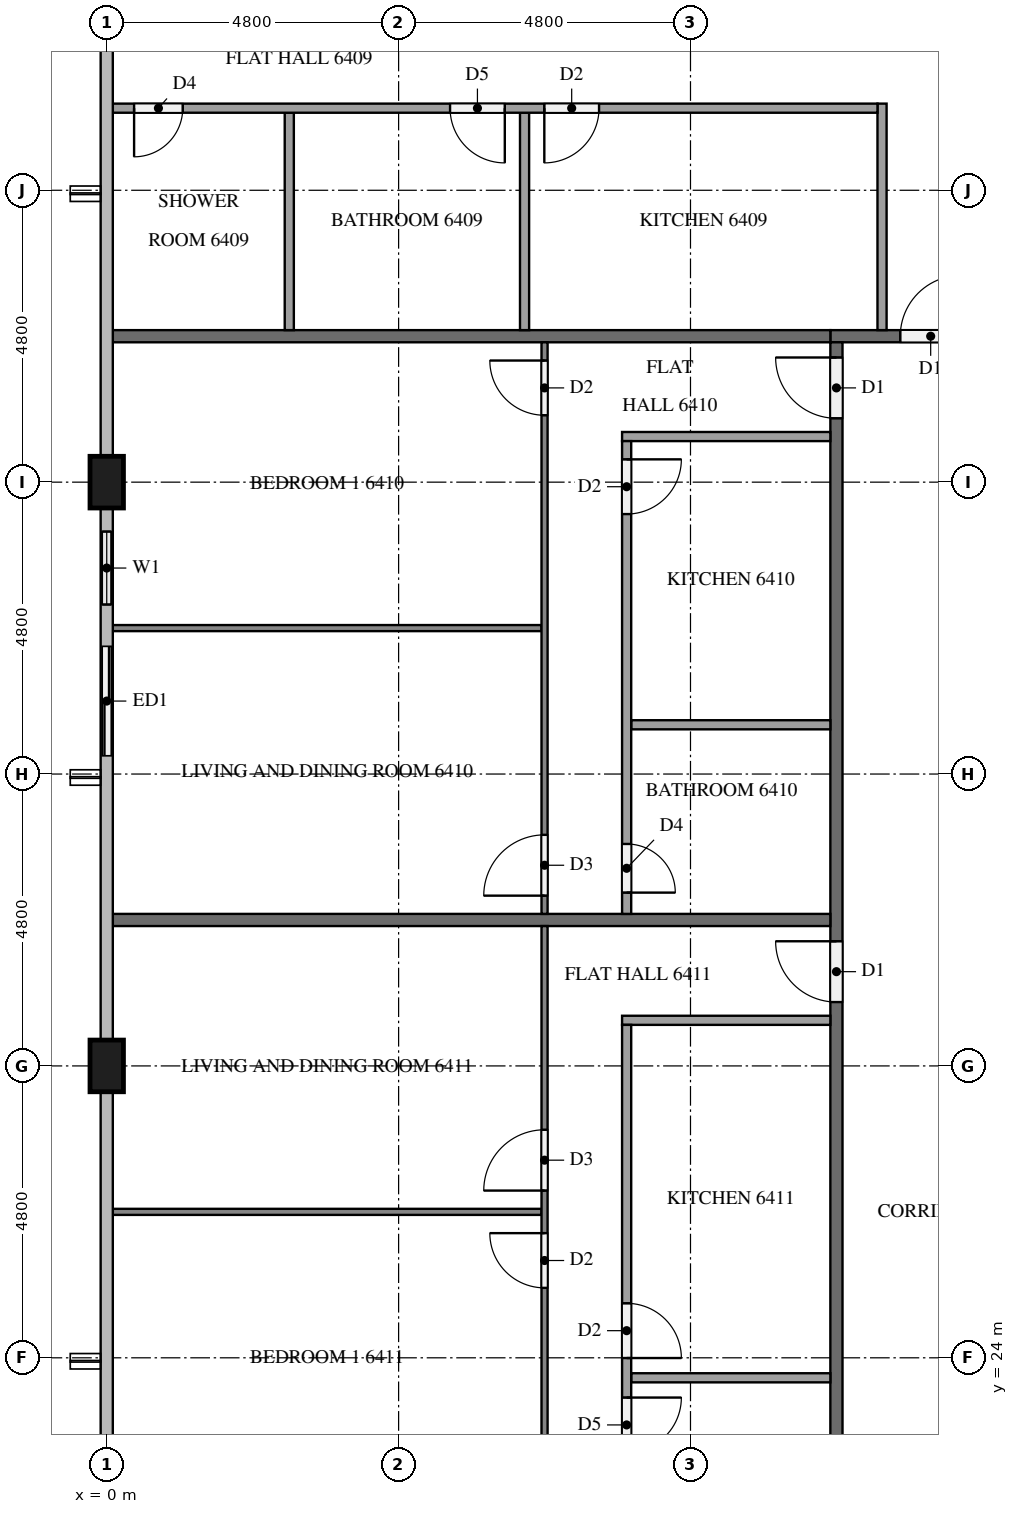
"""IFC4 building model, lengths in metres.
Left out: names, types, materials, properties, quantities, classifications, styles, units other than length and angle.
Written with IfcOpenShell. Run it as: python <this file> out.ifc"""

import sys

from ifc_helpers import new_model, si_unit, direction, frame, frame_2d, origin, origin_2d, place, context, subcontext, project, spatial, rectangle, extrude, element, fill, save


model = new_model("IFC4")
c1 = context("Model", 3, precision=1e-05, world=origin(), true_north=direction((0.0, 1.0)))
c2 = subcontext(c1, "Body", "Model", "MODEL_VIEW")
j1 = project(units=[si_unit("LENGTHUNIT", "METRE"), si_unit("PLANEANGLEUNIT", "RADIAN")], contexts=[c1])
p1 = place(None, origin())
s1 = spatial("IfcSite", under=j1, at=p1, CompositionType="ELEMENT")
p2 = place(p1, origin())
s2 = spatial("IfcBuilding", under=s1, at=p2, CompositionType="ELEMENT")
p3 = place(p2, frame((0.0, 0.0, 245.7)))
s3 = spatial("IfcBuildingStorey", under=s2, at=p3, CompositionType="ELEMENT", Elevation=245.7)
for number, where, z_axis, x_axis in (
    (1, (0.0, 38.4, 0.0), (0.0, 0.0, 1.0), (0.0, 1.0, 0.0)),
    (2, (0.0, 28.8, 0.0), (0.0, 0.0, 1.0), (0.0, 1.0, 0.0)),
):
    element("IfcColumn", number, at=place(p3, frame(where, z_axis=z_axis, x_axis=x_axis)), inside=s3, PredefinedType="COLUMN", context=c2, shape_type="SweptSolid", body=[
        extrude(rectangle(XDim=0.85, YDim=0.55, at=origin_2d()), origin(), (0.0, 0.0, 1.0), 3.2),
    ])
p4 = place(p3, frame((0.0, 37.975, 0.0), z_axis=(0.0, 0.0, 1.0), x_axis=(0.0, -1.0, 0.0)))
e3 = element("IfcWall", 3, at=p4, inside=s3, PredefinedType="SOLIDWALL", context=c2, shape_type="SweptSolid", body=[
    extrude(rectangle(XDim=4.375, YDim=0.15, at=frame_2d((2.188, 0.0))), origin(), (0.0, 0.0, 1.0), 3.2),
])
p5 = place(p4, frame((0.387, 0.0, 0.9)))
e4 = element("IfcOpeningElement", 4, at=p5, cuts=e3, PredefinedType="OPENING", context=c2, shape_type="SweptSolid", body=[
    extrude(rectangle(XDim=1.2, YDim=1.4, at=frame_2d((0.6, 0.7))), frame((0.0, 0.085, 0.0), z_axis=(0.0, -1.0, 0.0), x_axis=(1.0, 0.0, 0.0)), (0.0, 0.0, 1.0), 0.17),
])
p6 = place(p4, frame((2.275, 0.0, 0.0)))
e5 = element("IfcOpeningElement", 5, at=p6, cuts=e3, PredefinedType="OPENING", context=c2, shape_type="SweptSolid", body=[
    extrude(rectangle(XDim=1.8, YDim=2.4, at=frame_2d((0.9, 1.2))), frame((0.0, 0.085, 0.0), z_axis=(0.0, -1.0, 0.0), x_axis=(1.0, 0.0, 0.0)), (0.0, 0.0, 1.0), 0.17),
])
p7 = place(p3, frame((11.9, 40.8, 0.0), z_axis=(0.0, 0.0, 1.0), x_axis=(1.0, 0.0, 0.0)))
e6 = element("IfcWall", 6, at=p7, inside=s3, PredefinedType="PARTITIONING", context=c2, shape_type="SweptSolid", body=[
    extrude(rectangle(XDim=38.6, YDim=0.2, at=frame_2d((19.3, 0.0))), origin(), (0.0, 0.0, 1.0), 3.2),
])
p8 = place(p7, frame((34.05, 0.0, 0.0)))
e7 = element("IfcOpeningElement", 7, at=p8, cuts=e6, PredefinedType="OPENING", context=c2, shape_type="SweptSolid", body=[
    extrude(rectangle(XDim=1.0, YDim=2.1, at=frame_2d((0.5, 1.05))), frame((0.0, 0.11, 0.0), z_axis=(0.0, -1.0, 0.0), x_axis=(1.0, 0.0, 0.0)), (0.0, 0.0, 1.0), 0.22),
])
p9 = place(p7, frame((32.3, 0.0, 0.0)))
e8 = element("IfcOpeningElement", 8, at=p9, cuts=e6, PredefinedType="OPENING", context=c2, shape_type="SweptSolid", body=[
    extrude(rectangle(XDim=1.1, YDim=2.1, at=frame_2d((0.55, 1.05))), frame((0.0, 0.11, 0.0), z_axis=(0.0, -1.0, 0.0), x_axis=(1.0, 0.0, 0.0)), (0.0, 0.0, 1.0), 0.22),
])
p10 = place(p7, frame((2.85, 0.0, 0.0)))
e9 = element("IfcOpeningElement", 9, at=p10, cuts=e6, PredefinedType="OPENING", context=c2, shape_type="SweptSolid", body=[
    extrude(rectangle(XDim=1.0, YDim=2.1, at=frame_2d((0.5, 1.05))), frame((0.0, 0.11, 0.0), z_axis=(0.0, -1.0, 0.0), x_axis=(1.0, 0.0, 0.0)), (0.0, 0.0, 1.0), 0.22),
])
p11 = place(p7, frame((1.15, 0.0, 0.0)))
e10 = element("IfcOpeningElement", 10, at=p11, cuts=e6, PredefinedType="OPENING", context=c2, shape_type="SweptSolid", body=[
    extrude(rectangle(XDim=1.0, YDim=2.1, at=frame_2d((0.5, 1.05))), frame((0.0, 0.11, 0.0), z_axis=(0.0, -1.0, 0.0), x_axis=(1.0, 0.0, 0.0)), (0.0, 0.0, 1.0), 0.22),
])
p12 = place(p3, frame((12.0, 12.1, 0.0), z_axis=(0.0, 0.0, 1.0), x_axis=(0.0, 1.0, 0.0)))
e11 = element("IfcWall", 11, at=p12, inside=s3, PredefinedType="PARTITIONING", context=c2, shape_type="SweptSolid", body=[
    extrude(rectangle(XDim=28.6, YDim=0.2, at=frame_2d((14.3, 0.0))), origin(), (0.0, 0.0, 1.0), 3.2),
])
p13 = place(p12, frame((27.35, 0.0, 0.0)))
e12 = element("IfcOpeningElement", 12, at=p13, cuts=e11, PredefinedType="OPENING", context=c2, shape_type="SweptSolid", body=[
    extrude(rectangle(XDim=1.0, YDim=2.1, at=frame_2d((0.5, 1.05))), frame((0.0, 0.11, 0.0), z_axis=(0.0, -1.0, 0.0), x_axis=(1.0, 0.0, 0.0)), (0.0, 0.0, 1.0), 0.22),
])
p14 = place(p12, frame((17.75, 0.0, 0.0)))
e13 = element("IfcOpeningElement", 13, at=p14, cuts=e11, PredefinedType="OPENING", context=c2, shape_type="SweptSolid", body=[
    extrude(rectangle(XDim=1.0, YDim=2.1, at=frame_2d((0.5, 1.05))), frame((0.0, 0.11, 0.0), z_axis=(0.0, -1.0, 0.0), x_axis=(1.0, 0.0, 0.0)), (0.0, 0.0, 1.0), 0.22),
])
p15 = place(p12, frame((3.35, 0.0, 0.0)))
e14 = element("IfcOpeningElement", 14, at=p15, cuts=e11, PredefinedType="OPENING", context=c2, shape_type="SweptSolid", body=[
    extrude(rectangle(XDim=1.0, YDim=2.1, at=frame_2d((0.5, 1.05))), frame((0.0, 0.11, 0.0), z_axis=(0.0, -1.0, 0.0), x_axis=(1.0, 0.0, 0.0)), (0.0, 0.0, 1.0), 0.22),
])
for number, where, z_axis, x_axis in (
    (15, (0.1, 40.8, 0.0), (0.0, 0.0, 1.0), (1.0, 0.0, 0.0)),
    (16, (0.1, 31.2, 0.0), (0.0, 0.0, 1.0), (1.0, 0.0, 0.0)),
):
    element("IfcWall", number, at=place(p3, frame(where, z_axis=z_axis, x_axis=x_axis)), inside=s3, PredefinedType="PARTITIONING", context=c2, shape_type="SweptSolid", body=[
        extrude(rectangle(XDim=11.8, YDim=0.2, at=frame_2d((5.9, 0.0))), origin(), (0.0, 0.0, 1.0), 3.2),
    ])
for number, where, z_axis, x_axis in (
    (17, (6.871, 40.9, 0.0), (0.0, 0.0, 1.0), (0.0, 1.0, 0.0)),
    (18, (3.002, 40.9, 0.0), (0.0, 0.0, 1.0), (0.0, 1.0, 0.0)),
):
    element("IfcWall", number, at=place(p3, frame(where, z_axis=z_axis, x_axis=x_axis)), inside=s3, PredefinedType="PARTITIONING", context=c2, shape_type="SweptSolid", body=[
        extrude(rectangle(XDim=3.575, YDim=0.15, at=frame_2d((1.788, 0.0))), origin(), (0.0, 0.0, 1.0), 3.2),
    ])
p16 = place(p3, frame((12.75, 40.9, 0.0), z_axis=(0.0, 0.0, 1.0), x_axis=(0.0, 1.0, 0.0)))
e19 = element("IfcWall", 19, at=p16, inside=s3, PredefinedType="PARTITIONING", context=c2, shape_type="SweptSolid", body=[
    extrude(rectangle(XDim=3.725, YDim=0.15, at=frame_2d((1.863, 0.0))), origin(), (0.0, 0.0, 1.0), 3.2),
])
p17 = place(p3, frame((12.675, 44.55, 0.0), z_axis=(0.0, 0.0, 1.0), x_axis=(-1.0, 0.0, 0.0)))
e20 = element("IfcWall", 20, at=p17, inside=s3, PredefinedType="PARTITIONING", context=c2, shape_type="SweptSolid", body=[
    extrude(rectangle(XDim=12.575, YDim=0.15, at=frame_2d((6.288, 0.0))), origin(), (0.0, 0.0, 1.0), 3.2),
])
p18 = place(p17, frame((4.579, 0.0, 0.0)))
e21 = element("IfcOpeningElement", 21, at=p18, cuts=e20, PredefinedType="OPENING", context=c2, shape_type="SweptSolid", body=[
    extrude(rectangle(XDim=0.9, YDim=2.1, at=frame_2d((0.45, 1.05))), frame((0.0, 0.085, 0.0), z_axis=(0.0, -1.0, 0.0), x_axis=(1.0, 0.0, 0.0)), (0.0, 0.0, 1.0), 0.17),
])
p19 = place(p17, frame((6.129, 0.0, 0.0)))
e22 = element("IfcOpeningElement", 22, at=p19, cuts=e20, PredefinedType="OPENING", context=c2, shape_type="SweptSolid", body=[
    extrude(rectangle(XDim=0.9, YDim=2.1, at=frame_2d((0.45, 1.05))), frame((0.0, 0.085, 0.0), z_axis=(0.0, -1.0, 0.0), x_axis=(1.0, 0.0, 0.0)), (0.0, 0.0, 1.0), 0.17),
])
p20 = place(p17, frame((11.425, 0.0, 0.0)))
e23 = element("IfcOpeningElement", 23, at=p20, cuts=e20, PredefinedType="OPENING", context=c2, shape_type="SweptSolid", body=[
    extrude(rectangle(XDim=0.8, YDim=2.1, at=frame_2d((0.4, 1.05))), frame((0.0, 0.085, 0.0), z_axis=(0.0, -1.0, 0.0), x_axis=(1.0, 0.0, 0.0)), (0.0, 0.0, 1.0), 0.17),
])
p21 = place(p3, frame((7.15, 36.0, 0.0), z_axis=(0.0, 0.0, 1.0), x_axis=(-1.0, 0.0, 0.0)))
e24 = element("IfcWall", 24, at=p21, inside=s3, PredefinedType="PARTITIONING", context=c2, shape_type="SweptSolid", body=[
    extrude(rectangle(XDim=7.05, YDim=0.1, at=frame_2d((3.525, 0.0))), origin(), (0.0, 0.0, 1.0), 3.2),
])
p22 = place(p3, frame((7.2, 31.3, 0.0), z_axis=(0.0, 0.0, 1.0), x_axis=(0.0, 1.0, 0.0)))
e25 = element("IfcWall", 25, at=p22, inside=s3, PredefinedType="PARTITIONING", context=c2, shape_type="SweptSolid", body=[
    extrude(rectangle(XDim=9.4, YDim=0.1, at=frame_2d((4.7, 0.0))), origin(), (0.0, 0.0, 1.0), 3.2),
])
p23 = place(p22, frame((8.2, 0.0, 0.0)))
e26 = element("IfcOpeningElement", 26, at=p23, cuts=e25, PredefinedType="OPENING", context=c2, shape_type="SweptSolid", body=[
    extrude(rectangle(XDim=0.9, YDim=2.1, at=frame_2d((0.45, 1.05))), frame((0.0, 0.06, 0.0), z_axis=(0.0, -1.0, 0.0), x_axis=(1.0, 0.0, 0.0)), (0.0, 0.0, 1.0), 0.12),
])
p24 = place(p22, frame((0.3, 0.0, 0.0)))
e27 = element("IfcOpeningElement", 27, at=p24, cuts=e25, PredefinedType="OPENING", context=c2, shape_type="SweptSolid", body=[
    extrude(rectangle(XDim=1.0, YDim=2.1, at=frame_2d((0.5, 1.05))), frame((0.0, 0.06, 0.0), z_axis=(0.0, -1.0, 0.0), x_axis=(1.0, 0.0, 0.0)), (0.0, 0.0, 1.0), 0.12),
])
p25 = place(p3, frame((11.9, 34.41, 0.0), z_axis=(0.0, 0.0, 1.0), x_axis=(-1.0, 0.0, 0.0)))
e28 = element("IfcWall", 28, at=p25, inside=s3, PredefinedType="PARTITIONING", context=c2, shape_type="SweptSolid", body=[
    extrude(rectangle(XDim=3.275, YDim=0.15, at=frame_2d((1.637, 0.0))), origin(), (0.0, 0.0, 1.0), 3.2),
])
p26 = place(p3, frame((11.9, 39.15, 0.0), z_axis=(0.0, 0.0, 1.0), x_axis=(-1.0, 0.0, 0.0)))
e29 = element("IfcWall", 29, at=p26, inside=s3, PredefinedType="PARTITIONING", context=c2, shape_type="SweptSolid", body=[
    extrude(rectangle(XDim=3.425, YDim=0.15, at=frame_2d((1.712, 0.0))), origin(), (0.0, 0.0, 1.0), 3.2),
])
p27 = place(p3, frame((8.55, 39.075, 0.0), z_axis=(0.0, 0.0, 1.0), x_axis=(0.0, -1.0, 0.0)))
e30 = element("IfcWall", 30, at=p27, inside=s3, PredefinedType="PARTITIONING", context=c2, shape_type="SweptSolid", body=[
    extrude(rectangle(XDim=7.775, YDim=0.15, at=frame_2d((3.887, 0.0))), origin(), (0.0, 0.0, 1.0), 3.2),
])
p28 = place(p27, frame((0.3, 0.0, 0.0)))
e31 = element("IfcOpeningElement", 31, at=p28, cuts=e30, PredefinedType="OPENING", context=c2, shape_type="SweptSolid", body=[
    extrude(rectangle(XDim=0.9, YDim=2.1, at=frame_2d((0.45, 1.05))), frame((0.0, 0.085, 0.0), z_axis=(0.0, -1.0, 0.0), x_axis=(1.0, 0.0, 0.0)), (0.0, 0.0, 1.0), 0.17),
])
p29 = place(p27, frame((6.625, 0.0, 0.0)))
e32 = element("IfcOpeningElement", 32, at=p29, cuts=e30, PredefinedType="OPENING", context=c2, shape_type="SweptSolid", body=[
    extrude(rectangle(XDim=0.8, YDim=2.1, at=frame_2d((0.4, 1.05))), frame((0.0, 0.085, 0.0), z_axis=(0.0, -1.0, 0.0), x_axis=(1.0, 0.0, 0.0)), (0.0, 0.0, 1.0), 0.17),
])
p30 = place(p3, frame((7.15, 26.4, 0.0), z_axis=(0.0, 0.0, 1.0), x_axis=(-1.0, 0.0, 0.0)))
e33 = element("IfcWall", 33, at=p30, inside=s3, PredefinedType="PARTITIONING", context=c2, shape_type="SweptSolid", body=[
    extrude(rectangle(XDim=7.05, YDim=0.1, at=frame_2d((3.525, 0.0))), origin(), (0.0, 0.0, 1.0), 3.2),
])
p31 = place(p3, frame((7.2, 16.9, 0.0), z_axis=(0.0, 0.0, 1.0), x_axis=(0.0, 1.0, 0.0)))
e34 = element("IfcWall", 34, at=p31, inside=s3, PredefinedType="PARTITIONING", context=c2, shape_type="SweptSolid", body=[
    extrude(rectangle(XDim=14.2, YDim=0.1, at=frame_2d((7.1, 0.0))), origin(), (0.0, 0.0, 1.0), 3.2),
])
p32 = place(p31, frame((9.85, 0.0, 0.0)))
e35 = element("IfcOpeningElement", 35, at=p32, cuts=e34, PredefinedType="OPENING", context=c2, shape_type="SweptSolid", body=[
    extrude(rectangle(XDim=1.0, YDim=2.1, at=frame_2d((0.5, 1.05))), frame((0.0, 0.06, 0.0), z_axis=(0.0, -1.0, 0.0), x_axis=(1.0, 0.0, 0.0)), (0.0, 0.0, 1.0), 0.12),
])
p33 = place(p31, frame((8.25, 0.0, 0.0)))
e36 = element("IfcOpeningElement", 36, at=p33, cuts=e34, PredefinedType="OPENING", context=c2, shape_type="SweptSolid", body=[
    extrude(rectangle(XDim=0.9, YDim=2.1, at=frame_2d((0.45, 1.05))), frame((0.0, 0.06, 0.0), z_axis=(0.0, -1.0, 0.0), x_axis=(1.0, 0.0, 0.0)), (0.0, 0.0, 1.0), 0.12),
])
p34 = place(p31, frame((0.3, 0.0, 0.0)))
e37 = element("IfcOpeningElement", 37, at=p34, cuts=e34, PredefinedType="OPENING", context=c2, shape_type="SweptSolid", body=[
    extrude(rectangle(XDim=0.9, YDim=2.1, at=frame_2d((0.45, 1.05))), frame((0.0, 0.06, 0.0), z_axis=(0.0, -1.0, 0.0), x_axis=(1.0, 0.0, 0.0)), (0.0, 0.0, 1.0), 0.12),
])
p35 = place(p3, frame((11.9, 23.671, 0.0), z_axis=(0.0, 0.0, 1.0), x_axis=(-1.0, 0.0, 0.0)))
e38 = element("IfcWall", 38, at=p35, inside=s3, PredefinedType="PARTITIONING", context=c2, shape_type="SweptSolid", body=[
    extrude(rectangle(XDim=3.275, YDim=0.15, at=frame_2d((1.637, 0.0))), origin(), (0.0, 0.0, 1.0), 3.2),
])
p36 = place(p3, frame((11.9, 29.55, 0.0), z_axis=(0.0, 0.0, 1.0), x_axis=(-1.0, 0.0, 0.0)))
e39 = element("IfcWall", 39, at=p36, inside=s3, PredefinedType="PARTITIONING", context=c2, shape_type="SweptSolid", body=[
    extrude(rectangle(XDim=3.425, YDim=0.15, at=frame_2d((1.712, 0.0))), origin(), (0.0, 0.0, 1.0), 3.2),
])
p37 = place(p3, frame((8.55, 29.475, 0.0), z_axis=(0.0, 0.0, 1.0), x_axis=(0.0, -1.0, 0.0)))
e40 = element("IfcWall", 40, at=p37, inside=s3, PredefinedType="PARTITIONING", context=c2, shape_type="SweptSolid", body=[
    extrude(rectangle(XDim=12.575, YDim=0.15, at=frame_2d((6.288, 0.0))), origin(), (0.0, 0.0, 1.0), 3.2),
])
p38 = place(p37, frame((4.579, 0.0, 0.0)))
e41 = element("IfcOpeningElement", 41, at=p38, cuts=e40, PredefinedType="OPENING", context=c2, shape_type="SweptSolid", body=[
    extrude(rectangle(XDim=0.9, YDim=2.1, at=frame_2d((0.45, 1.05))), frame((0.0, 0.085, 0.0), z_axis=(0.0, -1.0, 0.0), x_axis=(1.0, 0.0, 0.0)), (0.0, 0.0, 1.0), 0.17),
])
p39 = place(p37, frame((6.129, 0.0, 0.0)))
e42 = element("IfcOpeningElement", 42, at=p39, cuts=e40, PredefinedType="OPENING", context=c2, shape_type="SweptSolid", body=[
    extrude(rectangle(XDim=0.9, YDim=2.1, at=frame_2d((0.45, 1.05))), frame((0.0, 0.085, 0.0), z_axis=(0.0, -1.0, 0.0), x_axis=(1.0, 0.0, 0.0)), (0.0, 0.0, 1.0), 0.17),
])
p40 = place(p37, frame((11.425, 0.0, 0.0)))
e43 = element("IfcOpeningElement", 43, at=p40, cuts=e40, PredefinedType="OPENING", context=c2, shape_type="SweptSolid", body=[
    extrude(rectangle(XDim=0.8, YDim=2.1, at=frame_2d((0.4, 1.05))), frame((0.0, 0.085, 0.0), z_axis=(0.0, -1.0, 0.0), x_axis=(1.0, 0.0, 0.0)), (0.0, 0.0, 1.0), 0.17),
])
p41 = place(p5, origin())
e44 = element("IfcWindow", 44, at=p41, inside=s3, PartitioningType="SINGLE_PANEL", PredefinedType="WINDOW", context=c2, shape_type="SweptSolid", body=[
    extrude(rectangle(XDim=1.2, YDim=1.4, at=frame_2d((0.6, 0.7))), frame((0.0, 0.03, 0.0), z_axis=(0.0, -1.0, 0.0), x_axis=(1.0, 0.0, 0.0)), (0.0, 0.0, 1.0), 0.06),
])
fill(e4, e44)
p42 = place(p6, origin())
e45 = element("IfcDoor", 45, at=p42, inside=s3, OperationType="SLIDING_TO_LEFT", PredefinedType="DOOR", context=c2, shape_type="SweptSolid", body=[
    extrude(rectangle(XDim=1.8, YDim=2.4, at=frame_2d((0.9, 1.2))), frame((0.0, 0.025, 0.0), z_axis=(0.0, -1.0, 0.0), x_axis=(1.0, 0.0, 0.0)), (0.0, 0.0, 1.0), 0.05),
])
fill(e5, e45)
p43 = place(p11, origin())
e46 = element("IfcDoor", 46, at=p43, inside=s3, OperationType="SINGLE_SWING_RIGHT", PredefinedType="DOOR", context=c2, shape_type="SweptSolid", body=[
    extrude(rectangle(XDim=1.0, YDim=2.1, at=frame_2d((0.5, 1.05))), frame((0.0, 0.025, 0.0), z_axis=(0.0, -1.0, 0.0), x_axis=(1.0, 0.0, 0.0)), (0.0, 0.0, 1.0), 0.05),
])
fill(e10, e46)
p44 = place(p13, origin())
e47 = element("IfcDoor", 47, at=p44, inside=s3, OperationType="SINGLE_SWING_RIGHT", PredefinedType="DOOR", context=c2, shape_type="SweptSolid", body=[
    extrude(rectangle(XDim=1.0, YDim=2.1, at=frame_2d((0.5, 1.05))), frame((0.0, 0.025, 0.0), z_axis=(0.0, -1.0, 0.0), x_axis=(1.0, 0.0, 0.0)), (0.0, 0.0, 1.0), 0.05),
])
fill(e12, e47)
p45 = place(p14, origin())
e48 = element("IfcDoor", 48, at=p45, inside=s3, OperationType="SINGLE_SWING_RIGHT", PredefinedType="DOOR", context=c2, shape_type="SweptSolid", body=[
    extrude(rectangle(XDim=1.0, YDim=2.1, at=frame_2d((0.5, 1.05))), frame((0.0, 0.025, 0.0), z_axis=(0.0, -1.0, 0.0), x_axis=(1.0, 0.0, 0.0)), (0.0, 0.0, 1.0), 0.05),
])
fill(e13, e48)
p46 = place(p18, origin())
e49 = element("IfcDoor", 49, at=p46, inside=s3, OperationType="SINGLE_SWING_RIGHT", PredefinedType="DOOR", context=c2, shape_type="SweptSolid", body=[
    extrude(rectangle(XDim=0.9, YDim=2.1, at=frame_2d((0.45, 1.05))), frame((0.0, 0.025, 0.0), z_axis=(0.0, -1.0, 0.0), x_axis=(1.0, 0.0, 0.0)), (0.0, 0.0, 1.0), 0.05),
])
fill(e21, e49)
p47 = place(p19, origin())
e50 = element("IfcDoor", 50, at=p47, inside=s3, OperationType="SINGLE_SWING_LEFT", PredefinedType="DOOR", context=c2, shape_type="SweptSolid", body=[
    extrude(rectangle(XDim=0.9, YDim=2.1, at=frame_2d((0.45, 1.05))), frame((0.0, 0.025, 0.0), z_axis=(0.0, -1.0, 0.0), x_axis=(1.0, 0.0, 0.0)), (0.0, 0.0, 1.0), 0.05),
])
fill(e22, e50)
p48 = place(p20, origin())
e51 = element("IfcDoor", 51, at=p48, inside=s3, OperationType="SINGLE_SWING_RIGHT", PredefinedType="DOOR", context=c2, shape_type="SweptSolid", body=[
    extrude(rectangle(XDim=0.8, YDim=2.1, at=frame_2d((0.4, 1.05))), frame((0.0, 0.025, 0.0), z_axis=(0.0, -1.0, 0.0), x_axis=(1.0, 0.0, 0.0)), (0.0, 0.0, 1.0), 0.05),
])
fill(e23, e51)
p49 = place(p23, origin())
e52 = element("IfcDoor", 52, at=p49, inside=s3, OperationType="SINGLE_SWING_RIGHT", PredefinedType="DOOR", context=c2, shape_type="SweptSolid", body=[
    extrude(rectangle(XDim=0.9, YDim=2.1, at=frame_2d((0.45, 1.05))), frame((0.0, 0.025, 0.0), z_axis=(0.0, -1.0, 0.0), x_axis=(1.0, 0.0, 0.0)), (0.0, 0.0, 1.0), 0.05),
])
fill(e26, e52)
p50 = place(p24, origin())
e53 = element("IfcDoor", 53, at=p50, inside=s3, OperationType="SINGLE_SWING_LEFT", PredefinedType="DOOR", context=c2, shape_type="SweptSolid", body=[
    extrude(rectangle(XDim=1.0, YDim=2.1, at=frame_2d((0.5, 1.05))), frame((0.0, 0.025, 0.0), z_axis=(0.0, -1.0, 0.0), x_axis=(1.0, 0.0, 0.0)), (0.0, 0.0, 1.0), 0.05),
])
fill(e27, e53)
p51 = place(p28, origin())
e54 = element("IfcDoor", 54, at=p51, inside=s3, OperationType="SINGLE_SWING_LEFT", PredefinedType="DOOR", context=c2, shape_type="SweptSolid", body=[
    extrude(rectangle(XDim=0.9, YDim=2.1, at=frame_2d((0.45, 1.05))), frame((0.0, 0.025, 0.0), z_axis=(0.0, -1.0, 0.0), x_axis=(1.0, 0.0, 0.0)), (0.0, 0.0, 1.0), 0.05),
])
fill(e31, e54)
p52 = place(p29, origin())
e55 = element("IfcDoor", 55, at=p52, inside=s3, OperationType="SINGLE_SWING_RIGHT", PredefinedType="DOOR", context=c2, shape_type="SweptSolid", body=[
    extrude(rectangle(XDim=0.8, YDim=2.1, at=frame_2d((0.4, 1.05))), frame((0.0, 0.025, 0.0), z_axis=(0.0, -1.0, 0.0), x_axis=(1.0, 0.0, 0.0)), (0.0, 0.0, 1.0), 0.05),
])
fill(e32, e55)
p53 = place(p32, origin())
e56 = element("IfcDoor", 56, at=p53, inside=s3, OperationType="SINGLE_SWING_LEFT", PredefinedType="DOOR", context=c2, shape_type="SweptSolid", body=[
    extrude(rectangle(XDim=1.0, YDim=2.1, at=frame_2d((0.5, 1.05))), frame((0.0, 0.025, 0.0), z_axis=(0.0, -1.0, 0.0), x_axis=(1.0, 0.0, 0.0)), (0.0, 0.0, 1.0), 0.05),
])
fill(e35, e56)
p54 = place(p33, origin())
e57 = element("IfcDoor", 57, at=p54, inside=s3, OperationType="SINGLE_SWING_RIGHT", PredefinedType="DOOR", context=c2, shape_type="SweptSolid", body=[
    extrude(rectangle(XDim=0.9, YDim=2.1, at=frame_2d((0.45, 1.05))), frame((0.0, 0.025, 0.0), z_axis=(0.0, -1.0, 0.0), x_axis=(1.0, 0.0, 0.0)), (0.0, 0.0, 1.0), 0.05),
])
fill(e36, e57)
p55 = place(p38, origin())
e58 = element("IfcDoor", 58, at=p55, inside=s3, OperationType="SINGLE_SWING_RIGHT", PredefinedType="DOOR", context=c2, shape_type="SweptSolid", body=[
    extrude(rectangle(XDim=0.9, YDim=2.1, at=frame_2d((0.45, 1.05))), frame((0.0, 0.025, 0.0), z_axis=(0.0, -1.0, 0.0), x_axis=(1.0, 0.0, 0.0)), (0.0, 0.0, 1.0), 0.05),
])
fill(e41, e58)
p56 = place(p39, origin())
e59 = element("IfcDoor", 59, at=p56, inside=s3, OperationType="SINGLE_SWING_LEFT", PredefinedType="DOOR", context=c2, shape_type="SweptSolid", body=[
    extrude(rectangle(XDim=0.9, YDim=2.1, at=frame_2d((0.45, 1.05))), frame((0.0, 0.025, 0.0), z_axis=(0.0, -1.0, 0.0), x_axis=(1.0, 0.0, 0.0)), (0.0, 0.0, 1.0), 0.05),
])
fill(e42, e59)
save(model, sys.argv[1])
